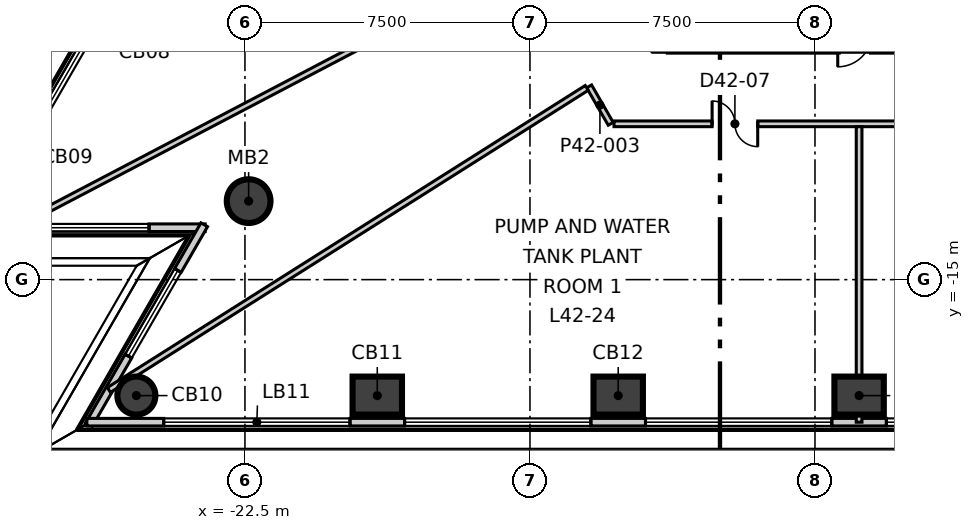
"""IFC4 building model, lengths in metres.
Left out: names, types, materials, properties, quantities, classifications, styles, units other than length and angle.
Written with IfcOpenShell. Run it as: python <this file> out.ifc"""

import sys

from ifc_helpers import new_model, si_unit, direction, frame, frame_2d, origin, origin_2d, place, context, subcontext, project, spatial, rectangle, circle, extrude, element, fill, save


model = new_model("IFC4")
c1 = context("Model", 3, precision=1e-05, world=origin(), true_north=direction((0.0, 1.0)))
c2 = subcontext(c1, "Body", "Model", "MODEL_VIEW")
j1 = project(units=[si_unit("LENGTHUNIT", "METRE"), si_unit("PLANEANGLEUNIT", "RADIAN")], contexts=[c1])
p1 = place(None, origin())
s1 = spatial("IfcSite", under=j1, at=p1, CompositionType="ELEMENT")
p2 = place(p1, origin())
s2 = spatial("IfcBuilding", under=s1, at=p2, CompositionType="ELEMENT")
p3 = place(p2, frame((0.0, 0.0, 180.8)))
s3 = spatial("IfcBuildingStorey", under=s2, at=p3, CompositionType="ELEMENT", Elevation=180.8)
p4 = place(p3, frame((-25.357, -18.051, -0.6), z_axis=(0.0, 0.0, 1.0), x_axis=(1.0, 0.0, 0.0)))
e1 = element("IfcColumn", 1, at=p4, inside=s3, PredefinedType="COLUMN", context=c2, shape_type="SweptSolid", body=[
    extrude(circle(Radius=0.5, at=origin_2d()), origin(), (0.0, 0.0, 1.0), 4.5),
])
for number, where, z_axis, x_axis in (
    (2, (-19.018, -18.051, -0.6), (0.0, 0.0, 1.0), (1.0, 0.0, 0.0)),
    (3, (-12.678, -18.051, -0.6), (0.0, 0.0, 1.0), (1.0, 0.0, 0.0)),
    (4, (-6.339, -18.051, -0.6), (0.0, 0.0, 1.0), (1.0, 0.0, 0.0)),
):
    element("IfcColumn", number, at=place(p3, frame(where, z_axis=z_axis, x_axis=x_axis)), inside=s3, PredefinedType="COLUMN", context=c2, shape_type="SweptSolid", body=[
        extrude(rectangle(XDim=1.3, YDim=1.0, at=origin_2d()), origin(), (0.0, 0.0, 1.0), 4.5),
    ])
p5 = place(p3, frame((-22.403, -12.934, -0.6), z_axis=(0.0, 0.0, 1.0), x_axis=(1.0, 0.0, 0.0)))
e5 = element("IfcColumn", 5, at=p5, inside=s3, PredefinedType="COLUMN", context=c2, shape_type="SweptSolid", body=[
    extrude(circle(Radius=0.575, at=origin_2d()), origin(), (0.0, 0.0, 1.0), 4.5),
])
p6 = place(p3, frame((-2.909, 32.463, 0.0), z_axis=(0.0, 0.0, 1.0), x_axis=(-0.500011769953, -0.866018608292, 0.0)))
e6 = element("IfcWall", 6, at=p6, inside=s3, PredefinedType="ELEMENTEDWALL", context=c2, shape_type="SweptSolid", body=[
    extrude(rectangle(XDim=53.299, YDim=0.2, at=frame_2d((26.649, 0.0))), origin(), (0.0, 0.0, 1.0), 3.9),
])
p7 = place(p6, frame((2.022, 0.0, 0.6)))
e7 = element("IfcOpeningElement", 7, at=p7, cuts=e6, PredefinedType="OPENING", context=c2, shape_type="SweptSolid", body=[
    extrude(rectangle(XDim=4.9, YDim=3.0, at=frame_2d((2.45, 1.5))), frame((0.0, 0.11, 0.0), z_axis=(0.0, -1.0, 0.0), x_axis=(1.0, 0.0, 0.0)), (0.0, 0.0, 1.0), 0.22),
])
p8 = place(p6, frame((8.361, 0.0, 0.6)))
e8 = element("IfcOpeningElement", 8, at=p8, cuts=e6, PredefinedType="OPENING", context=c2, shape_type="SweptSolid", body=[
    extrude(rectangle(XDim=4.9, YDim=3.0, at=frame_2d((2.45, 1.5))), frame((0.0, 0.11, 0.0), z_axis=(0.0, -1.0, 0.0), x_axis=(1.0, 0.0, 0.0)), (0.0, 0.0, 1.0), 0.22),
])
p9 = place(p6, frame((14.7, 0.0, 0.6)))
e9 = element("IfcOpeningElement", 9, at=p9, cuts=e6, PredefinedType="OPENING", context=c2, shape_type="SweptSolid", body=[
    extrude(rectangle(XDim=4.9, YDim=3.0, at=frame_2d((2.45, 1.5))), frame((0.0, 0.11, 0.0), z_axis=(0.0, -1.0, 0.0), x_axis=(1.0, 0.0, 0.0)), (0.0, 0.0, 1.0), 0.22),
])
p10 = place(p6, frame((21.04, 0.0, 0.6)))
e10 = element("IfcOpeningElement", 10, at=p10, cuts=e6, PredefinedType="OPENING", context=c2, shape_type="SweptSolid", body=[
    extrude(rectangle(XDim=4.9, YDim=3.0, at=frame_2d((2.45, 1.5))), frame((0.0, 0.11, 0.0), z_axis=(0.0, -1.0, 0.0), x_axis=(1.0, 0.0, 0.0)), (0.0, 0.0, 1.0), 0.22),
])
p11 = place(p6, frame((27.379, 0.0, 0.6)))
e11 = element("IfcOpeningElement", 11, at=p11, cuts=e6, PredefinedType="OPENING", context=c2, shape_type="SweptSolid", body=[
    extrude(rectangle(XDim=4.9, YDim=3.0, at=frame_2d((2.45, 1.5))), frame((0.0, 0.11, 0.0), z_axis=(0.0, -1.0, 0.0), x_axis=(1.0, 0.0, 0.0)), (0.0, 0.0, 1.0), 0.22),
])
p12 = place(p6, frame((33.718, 0.0, 0.6)))
e12 = element("IfcOpeningElement", 12, at=p12, cuts=e6, PredefinedType="OPENING", context=c2, shape_type="SweptSolid", body=[
    extrude(rectangle(XDim=4.9, YDim=3.0, at=frame_2d((2.45, 1.5))), frame((0.0, 0.11, 0.0), z_axis=(0.0, -1.0, 0.0), x_axis=(1.0, 0.0, 0.0)), (0.0, 0.0, 1.0), 0.22),
])
p13 = place(p6, frame((40.057, 0.0, 0.6)))
e13 = element("IfcOpeningElement", 13, at=p13, cuts=e6, PredefinedType="OPENING", context=c2, shape_type="SweptSolid", body=[
    extrude(rectangle(XDim=4.9, YDim=3.0, at=frame_2d((2.45, 1.5))), frame((0.0, 0.11, 0.0), z_axis=(0.0, -1.0, 0.0), x_axis=(1.0, 0.0, 0.0)), (0.0, 0.0, 1.0), 0.22),
])
p14 = place(p6, frame((46.396, 0.0, 0.6)))
e14 = element("IfcOpeningElement", 14, at=p14, cuts=e6, PredefinedType="OPENING", context=c2, shape_type="SweptSolid", body=[
    extrude(rectangle(XDim=4.9, YDim=3.0, at=frame_2d((2.45, 1.5))), frame((0.0, 0.11, 0.0), z_axis=(0.0, -1.0, 0.0), x_axis=(1.0, 0.0, 0.0)), (0.0, 0.0, 1.0), 0.22),
])
p15 = place(p3, frame((-29.614, -13.634, 0.0), z_axis=(0.0, 0.0, 1.0), x_axis=(1.0, 0.0, 0.0)))
e15 = element("IfcWall", 15, at=p15, inside=s3, PredefinedType="ELEMENTEDWALL", context=c2, shape_type="SweptSolid", body=[
    extrude(rectangle(XDim=6.068, YDim=0.2, at=frame_2d((3.034, 0.0))), origin(), (0.0, 0.0, 1.0), 3.9),
])
p16 = place(p15, frame((1.99, 0.0, 0.6)))
e16 = element("IfcOpeningElement", 16, at=p16, cuts=e15, PredefinedType="OPENING", context=c2, shape_type="SweptSolid", body=[
    extrude(rectangle(XDim=2.6, YDim=3.0, at=frame_2d((1.3, 1.5))), frame((0.0, 0.11, 0.0), z_axis=(0.0, -1.0, 0.0), x_axis=(1.0, 0.0, 0.0)), (0.0, 0.0, 1.0), 0.22),
])
p17 = place(p3, frame((-23.571, -13.556, 0.0), z_axis=(0.0, 0.0, 1.0), x_axis=(-0.499916304465, -0.866073720032, 0.0)))
e17 = element("IfcWall", 17, at=p17, inside=s3, PredefinedType="ELEMENTEDWALL", context=c2, shape_type="SweptSolid", body=[
    extrude(rectangle(XDim=6.069, YDim=0.2, at=frame_2d((3.034, 0.0))), origin(), (0.0, 0.0, 1.0), 3.9),
])
p18 = place(p17, frame((1.39, 0.0, 0.6)))
e18 = element("IfcOpeningElement", 18, at=p18, cuts=e17, PredefinedType="OPENING", context=c2, shape_type="SweptSolid", body=[
    extrude(rectangle(XDim=2.6, YDim=3.0, at=frame_2d((1.3, 1.5))), frame((0.0, 0.11, 0.0), z_axis=(0.0, -1.0, 0.0), x_axis=(1.0, 0.0, 0.0)), (0.0, 0.0, 1.0), 0.22),
])
p19 = place(p3, frame((-26.66, -18.751, 0.0), z_axis=(0.0, 0.0, 1.0), x_axis=(1.0, 0.0, 0.0)))
e19 = element("IfcWall", 19, at=p19, inside=s3, PredefinedType="ELEMENTEDWALL", context=c2, shape_type="SweptSolid", body=[
    extrude(rectangle(XDim=53.3, YDim=0.2, at=frame_2d((26.65, 0.0))), origin(), (0.0, 0.0, 1.0), 3.9),
])
p20 = place(p19, frame((2.023, 0.0, 0.6)))
e20 = element("IfcOpeningElement", 20, at=p20, cuts=e19, PredefinedType="OPENING", context=c2, shape_type="SweptSolid", body=[
    extrude(rectangle(XDim=4.9, YDim=3.0, at=frame_2d((2.45, 1.5))), frame((0.0, 0.11, 0.0), z_axis=(0.0, -1.0, 0.0), x_axis=(1.0, 0.0, 0.0)), (0.0, 0.0, 1.0), 0.22),
])
p21 = place(p19, frame((8.362, 0.0, 0.6)))
e21 = element("IfcOpeningElement", 21, at=p21, cuts=e19, PredefinedType="OPENING", context=c2, shape_type="SweptSolid", body=[
    extrude(rectangle(XDim=4.9, YDim=3.0, at=frame_2d((2.45, 1.5))), frame((0.0, 0.11, 0.0), z_axis=(0.0, -1.0, 0.0), x_axis=(1.0, 0.0, 0.0)), (0.0, 0.0, 1.0), 0.22),
])
p22 = place(p19, frame((14.701, 0.0, 0.6)))
e22 = element("IfcOpeningElement", 22, at=p22, cuts=e19, PredefinedType="OPENING", context=c2, shape_type="SweptSolid", body=[
    extrude(rectangle(XDim=4.9, YDim=3.0, at=frame_2d((2.45, 1.5))), frame((0.0, 0.11, 0.0), z_axis=(0.0, -1.0, 0.0), x_axis=(1.0, 0.0, 0.0)), (0.0, 0.0, 1.0), 0.22),
])
p23 = place(p19, frame((21.04, 0.0, 0.6)))
e23 = element("IfcOpeningElement", 23, at=p23, cuts=e19, PredefinedType="OPENING", context=c2, shape_type="SweptSolid", body=[
    extrude(rectangle(XDim=4.9, YDim=3.0, at=frame_2d((2.45, 1.5))), frame((0.0, 0.11, 0.0), z_axis=(0.0, -1.0, 0.0), x_axis=(1.0, 0.0, 0.0)), (0.0, 0.0, 1.0), 0.22),
])
p24 = place(p19, frame((27.38, 0.0, 0.6)))
e24 = element("IfcOpeningElement", 24, at=p24, cuts=e19, PredefinedType="OPENING", context=c2, shape_type="SweptSolid", body=[
    extrude(rectangle(XDim=4.9, YDim=3.0, at=frame_2d((2.45, 1.5))), frame((0.0, 0.11, 0.0), z_axis=(0.0, -1.0, 0.0), x_axis=(1.0, 0.0, 0.0)), (0.0, 0.0, 1.0), 0.22),
])
p25 = place(p19, frame((33.719, 0.0, 0.6)))
e25 = element("IfcOpeningElement", 25, at=p25, cuts=e19, PredefinedType="OPENING", context=c2, shape_type="SweptSolid", body=[
    extrude(rectangle(XDim=4.9, YDim=3.0, at=frame_2d((2.45, 1.5))), frame((0.0, 0.11, 0.0), z_axis=(0.0, -1.0, 0.0), x_axis=(1.0, 0.0, 0.0)), (0.0, 0.0, 1.0), 0.22),
])
p26 = place(p19, frame((40.058, 0.0, 0.6)))
e26 = element("IfcOpeningElement", 26, at=p26, cuts=e19, PredefinedType="OPENING", context=c2, shape_type="SweptSolid", body=[
    extrude(rectangle(XDim=4.9, YDim=3.0, at=frame_2d((2.45, 1.5))), frame((0.0, 0.11, 0.0), z_axis=(0.0, -1.0, 0.0), x_axis=(1.0, 0.0, 0.0)), (0.0, 0.0, 1.0), 0.22),
])
p27 = place(p19, frame((46.397, 0.0, 0.6)))
e27 = element("IfcOpeningElement", 27, at=p27, cuts=e19, PredefinedType="OPENING", context=c2, shape_type="SweptSolid", body=[
    extrude(rectangle(XDim=4.9, YDim=3.0, at=frame_2d((2.45, 1.5))), frame((0.0, 0.11, 0.0), z_axis=(0.0, -1.0, 0.0), x_axis=(1.0, 0.0, 0.0)), (0.0, 0.0, 1.0), 0.22),
])
p28 = place(p3, frame((-13.443, -9.915, 0.0), z_axis=(0.0, 0.0, 1.0), x_axis=(0.499672881641, -0.866214183301, 0.0)))
e28 = element("IfcWall", 28, at=p28, inside=s3, PredefinedType="PARTITIONING", context=c2, shape_type="SweptSolid", body=[
    extrude(rectangle(XDim=1.137, YDim=0.15, at=frame_2d((0.568, 0.0))), origin(), (0.0, 0.0, 1.0), 3.9),
])
p29 = place(p3, frame((-28.599, -13.634, 0.0), z_axis=(0.0, 0.0, 1.0), x_axis=(0.885727117854, 0.464206282485, 0.0)))
e29 = element("IfcWall", 29, at=p29, inside=s3, PredefinedType="PARTITIONING", context=c2, shape_type="SweptSolid", body=[
    extrude(rectangle(XDim=14.922, YDim=0.15, at=frame_2d((7.461, 0.0))), origin(), (0.0, 0.0, 1.0), 3.2),
])
p30 = place(p3, frame((-26.08, -17.903, 0.0), z_axis=(0.0, 0.0, 1.0), x_axis=(0.845301244448, 0.534290001904, 0.0)))
e30 = element("IfcWall", 30, at=p30, inside=s3, PredefinedType="PARTITIONING", context=c2, shape_type="SweptSolid", body=[
    extrude(rectangle(XDim=14.874, YDim=0.15, at=frame_2d((7.437, 0.0))), origin(), (0.0, 0.0, 1.0), 3.2),
])
p31 = place(p3, frame((-12.788, -10.9, 0.0), z_axis=(0.0, 0.0, 1.0), x_axis=(1.0, 0.0, 0.0)))
e31 = element("IfcWall", 31, at=p31, inside=s3, PredefinedType="PARTITIONING", context=c2, shape_type="SweptSolid", body=[
    extrude(rectangle(XDim=25.663, YDim=0.15, at=frame_2d((12.832, 0.0))), origin(), (0.0, 0.0, 1.0), 3.9),
])
p32 = place(p31, frame((2.581, 0.0, 0.0)))
e32 = element("IfcOpeningElement", 32, at=p32, cuts=e31, PredefinedType="OPENING", context=c2, shape_type="SweptSolid", body=[
    extrude(rectangle(XDim=1.2, YDim=2.1, at=frame_2d((0.6, 1.05))), frame((0.0, 0.085, 0.0), z_axis=(0.0, -1.0, 0.0), x_axis=(1.0, 0.0, 0.0)), (0.0, 0.0, 1.0), 0.17),
])
p33 = place(p31, frame((9.118, 0.0, 0.0)))
e33 = element("IfcOpeningElement", 33, at=p33, cuts=e31, PredefinedType="OPENING", context=c2, shape_type="SweptSolid", body=[
    extrude(rectangle(XDim=1.0, YDim=2.1, at=frame_2d((0.5, 1.05))), frame((0.0, 0.085, 0.0), z_axis=(0.0, -1.0, 0.0), x_axis=(1.0, 0.0, 0.0)), (0.0, 0.0, 1.0), 0.17),
])
p34 = place(p31, frame((15.457, 0.0, 0.0)))
e34 = element("IfcOpeningElement", 34, at=p34, cuts=e31, PredefinedType="OPENING", context=c2, shape_type="SweptSolid", body=[
    extrude(rectangle(XDim=1.0, YDim=2.1, at=frame_2d((0.5, 1.05))), frame((0.0, 0.085, 0.0), z_axis=(0.0, -1.0, 0.0), x_axis=(1.0, 0.0, 0.0)), (0.0, 0.0, 1.0), 0.17),
])
p35 = place(p31, frame((21.795, 0.0, 0.0)))
e35 = element("IfcOpeningElement", 35, at=p35, cuts=e31, PredefinedType="OPENING", context=c2, shape_type="SweptSolid", body=[
    extrude(rectangle(XDim=1.2, YDim=2.1, at=frame_2d((0.6, 1.05))), frame((0.0, 0.085, 0.0), z_axis=(0.0, -1.0, 0.0), x_axis=(1.0, 0.0, 0.0)), (0.0, 0.0, 1.0), 0.17),
])
p36 = place(p3, frame((-6.339, -18.751, 0.0), z_axis=(0.0, 0.0, 1.0), x_axis=(0.0, 1.0, 0.0)))
e36 = element("IfcWall", 36, at=p36, inside=s3, PredefinedType="PARTITIONING", context=c2, shape_type="SweptSolid", body=[
    extrude(rectangle(XDim=7.776, YDim=0.15, at=frame_2d((3.888, 0.0))), origin(), (0.0, 0.0, 1.0), 3.9),
])
p37 = place(p14, origin())
e37 = element("IfcWindow", 37, at=p37, inside=s3, PartitioningType="SINGLE_PANEL", PredefinedType="WINDOW", context=c2, shape_type="SweptSolid", body=[
    extrude(rectangle(XDim=4.9, YDim=3.0, at=frame_2d((2.45, 1.5))), frame((0.0, 0.03, 0.0), z_axis=(0.0, -1.0, 0.0), x_axis=(1.0, 0.0, 0.0)), (0.0, 0.0, 1.0), 0.06),
])
fill(e14, e37)
p38 = place(p16, origin())
e38 = element("IfcWindow", 38, at=p38, inside=s3, PartitioningType="SINGLE_PANEL", PredefinedType="WINDOW", context=c2, shape_type="SweptSolid", body=[
    extrude(rectangle(XDim=2.6, YDim=3.0, at=frame_2d((1.3, 1.5))), frame((0.0, 0.03, 0.0), z_axis=(0.0, -1.0, 0.0), x_axis=(1.0, 0.0, 0.0)), (0.0, 0.0, 1.0), 0.06),
])
fill(e16, e38)
p39 = place(p18, origin())
e39 = element("IfcWindow", 39, at=p39, inside=s3, PartitioningType="SINGLE_PANEL", PredefinedType="WINDOW", context=c2, shape_type="SweptSolid", body=[
    extrude(rectangle(XDim=2.6, YDim=3.0, at=frame_2d((1.3, 1.5))), frame((0.0, 0.03, 0.0), z_axis=(0.0, -1.0, 0.0), x_axis=(1.0, 0.0, 0.0)), (0.0, 0.0, 1.0), 0.06),
])
fill(e18, e39)
p40 = place(p20, origin())
e40 = element("IfcWindow", 40, at=p40, inside=s3, PartitioningType="SINGLE_PANEL", PredefinedType="WINDOW", context=c2, shape_type="SweptSolid", body=[
    extrude(rectangle(XDim=4.9, YDim=3.0, at=frame_2d((2.45, 1.5))), frame((0.0, 0.03, 0.0), z_axis=(0.0, -1.0, 0.0), x_axis=(1.0, 0.0, 0.0)), (0.0, 0.0, 1.0), 0.06),
])
fill(e20, e40)
p41 = place(p21, origin())
e41 = element("IfcWindow", 41, at=p41, inside=s3, PartitioningType="SINGLE_PANEL", PredefinedType="WINDOW", context=c2, shape_type="SweptSolid", body=[
    extrude(rectangle(XDim=4.9, YDim=3.0, at=frame_2d((2.45, 1.5))), frame((0.0, 0.03, 0.0), z_axis=(0.0, -1.0, 0.0), x_axis=(1.0, 0.0, 0.0)), (0.0, 0.0, 1.0), 0.06),
])
fill(e21, e41)
p42 = place(p22, origin())
e42 = element("IfcWindow", 42, at=p42, inside=s3, PartitioningType="SINGLE_PANEL", PredefinedType="WINDOW", context=c2, shape_type="SweptSolid", body=[
    extrude(rectangle(XDim=4.9, YDim=3.0, at=frame_2d((2.45, 1.5))), frame((0.0, 0.03, 0.0), z_axis=(0.0, -1.0, 0.0), x_axis=(1.0, 0.0, 0.0)), (0.0, 0.0, 1.0), 0.06),
])
fill(e22, e42)
p43 = place(p23, origin())
e43 = element("IfcWindow", 43, at=p43, inside=s3, PartitioningType="SINGLE_PANEL", PredefinedType="WINDOW", context=c2, shape_type="SweptSolid", body=[
    extrude(rectangle(XDim=4.9, YDim=3.0, at=frame_2d((2.45, 1.5))), frame((0.0, 0.03, 0.0), z_axis=(0.0, -1.0, 0.0), x_axis=(1.0, 0.0, 0.0)), (0.0, 0.0, 1.0), 0.06),
])
fill(e23, e43)
p44 = place(p32, origin())
e44 = element("IfcDoor", 44, at=p44, inside=s3, OperationType="DOUBLE_DOOR_SINGLE_SWING", PredefinedType="DOOR", context=c2, shape_type="SweptSolid", body=[
    extrude(rectangle(XDim=1.2, YDim=2.1, at=frame_2d((0.6, 1.05))), frame((0.0, 0.025, 0.0), z_axis=(0.0, -1.0, 0.0), x_axis=(1.0, 0.0, 0.0)), (0.0, 0.0, 1.0), 0.05),
])
fill(e32, e44)
save(model, sys.argv[1])
